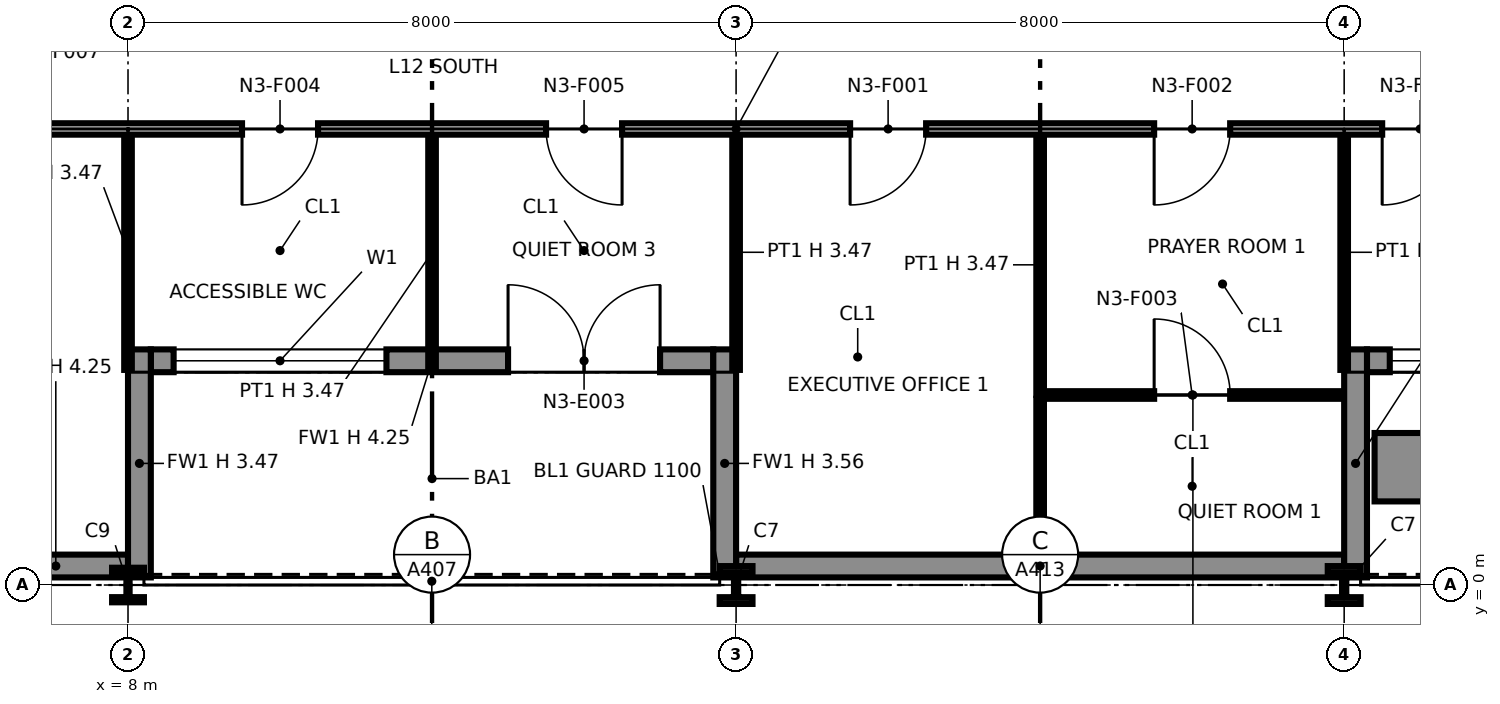
"""IFC4 building model, lengths in metres.
Left out: names, types, materials, properties, quantities, classifications, styles, units other than length and angle.
Written with IfcOpenShell. Run it as: python <this file> out.ifc"""

import sys

from ifc_helpers import new_model, si_unit, direction, frame, frame_2d, origin, origin_2d, place, context, subcontext, project, spatial, rectangle, i_section, extrude, element, fill, save


model = new_model("IFC4")
c1 = context("Model", 3, precision=1e-05, world=origin(), true_north=direction((0.0, 1.0)))
c2 = subcontext(c1, "Body", "Model", "MODEL_VIEW")
j1 = project(units=[si_unit("LENGTHUNIT", "METRE"), si_unit("PLANEANGLEUNIT", "RADIAN")], contexts=[c1])
p1 = place(None, origin())
s1 = spatial("IfcSite", under=j1, at=p1, CompositionType="ELEMENT")
p2 = place(p1, origin())
s2 = spatial("IfcBuilding", under=s1, at=p2, CompositionType="ELEMENT")
p3 = place(p2, frame((0.0, 0.0, 70.0)))
s3 = spatial("IfcBuildingStorey", under=s2, at=p3, CompositionType="ELEMENT", Elevation=70.0)
p4 = place(p3, frame((8.0, 0.0, 0.0), z_axis=(0.0, 0.0, 1.0), x_axis=(1.0, 0.0, 0.0)))
e1 = element("IfcColumn", 1, at=p4, inside=s3, PredefinedType="COLUMN", context=c2, shape_type="SweptSolid", body=[
    extrude(i_section(OverallWidth=0.419, OverallDepth=0.455, WebThickness=0.042, FlangeThickness=0.068, at=origin_2d()), origin(), (0.0, 0.0, 1.0), 4.25),
])
for number, where, z_axis, x_axis in (
    (2, (16.0, 0.0, 0.0), (0.0, 0.0, 1.0), (1.0, 0.0, 0.0)),
    (3, (24.0, 0.0, 0.0), (0.0, 0.0, 1.0), (1.0, 0.0, 0.0)),
):
    element("IfcColumn", number, at=place(p3, frame(where, z_axis=z_axis, x_axis=x_axis)), inside=s3, PredefinedType="COLUMN", context=c2, shape_type="SweptSolid", body=[
        extrude(i_section(OverallWidth=0.432, OverallDepth=0.498, WebThickness=0.056, FlangeThickness=0.089, at=origin_2d()), origin(), (0.0, 0.0, 1.0), 4.25),
    ])
p5 = place(p3, frame((6.1, 0.25, 0.0), z_axis=(0.0, 0.0, 1.0), x_axis=(1.0, 0.0, 0.0)))
e4 = element("IfcWall", 4, at=p5, inside=s3, PredefinedType="SOLIDWALL", context=c2, shape_type="SweptSolid", body=[
    extrude(rectangle(XDim=1.9, YDim=0.3, at=frame_2d((0.95, 0.0))), origin(), (0.0, 0.0, 1.0), 4.25),
])
p6 = place(p3, frame((8.3, 2.95, 0.0), z_axis=(0.0, 0.0, 1.0), x_axis=(1.0, 0.0, 0.0)))
e5 = element("IfcWall", 5, at=p6, inside=s3, PredefinedType="SOLIDWALL", context=c2, shape_type="SweptSolid", body=[
    extrude(rectangle(XDim=7.4, YDim=0.3, at=frame_2d((3.7, 0.0))), origin(), (0.0, 0.0, 1.0), 4.25),
])
p7 = place(p6, frame((0.3, 0.0, 0.9)))
e6 = element("IfcOpeningElement", 6, at=p7, cuts=e5, PredefinedType="OPENING", context=c2, shape_type="SweptSolid", body=[
    extrude(rectangle(XDim=2.8, YDim=2.2, at=frame_2d((1.4, 1.1))), frame((0.0, 0.16, 0.0), z_axis=(0.0, -1.0, 0.0), x_axis=(1.0, 0.0, 0.0)), (0.0, 0.0, 1.0), 0.32),
])
p8 = place(p6, frame((4.7, 0.0, 0.0)))
e7 = element("IfcOpeningElement", 7, at=p8, cuts=e5, PredefinedType="OPENING", context=c2, shape_type="SweptSolid", body=[
    extrude(rectangle(XDim=2.0, YDim=2.4, at=frame_2d((1.0, 1.2))), frame((0.0, 0.16, 0.0), z_axis=(0.0, -1.0, 0.0), x_axis=(1.0, 0.0, 0.0)), (0.0, 0.0, 1.0), 0.32),
])
p9 = place(p3, frame((8.15, 0.1, 0.0), z_axis=(0.0, 0.0, 1.0), x_axis=(0.0, 1.0, 0.0)))
e8 = element("IfcWall", 8, at=p9, inside=s3, PredefinedType="SOLIDWALL", context=c2, shape_type="SweptSolid", body=[
    extrude(rectangle(XDim=3.0, YDim=0.3, at=frame_2d((1.5, 0.0))), origin(), (0.0, 0.0, 1.0), 3.469),
])
p10 = place(p3, frame((15.85, 0.1, 0.0), z_axis=(0.0, 0.0, 1.0), x_axis=(0.0, 1.0, 0.0)))
e9 = element("IfcWall", 9, at=p10, inside=s3, PredefinedType="SOLIDWALL", context=c2, shape_type="SweptSolid", body=[
    extrude(rectangle(XDim=3.0, YDim=0.3, at=frame_2d((1.5, 0.0))), origin(), (0.0, 0.0, 1.0), 3.556),
])
p11 = place(p3, frame((16.0, 0.25, 0.0), z_axis=(0.0, 0.0, 1.0), x_axis=(1.0, 0.0, 0.0)))
e10 = element("IfcWall", 10, at=p11, inside=s3, PredefinedType="SOLIDWALL", context=c2, shape_type="SweptSolid", body=[
    extrude(rectangle(XDim=8.0, YDim=0.3, at=frame_2d((4.0, 0.0))), origin(), (0.0, 0.0, 1.0), 4.25),
])
p12 = place(p3, frame((24.3, 2.95, 0.0), z_axis=(0.0, 0.0, 1.0), x_axis=(1.0, 0.0, 0.0)))
e11 = element("IfcWall", 11, at=p12, inside=s3, PredefinedType="SOLIDWALL", context=c2, shape_type="SweptSolid", body=[
    extrude(rectangle(XDim=7.4, YDim=0.3, at=frame_2d((3.7, 0.0))), origin(), (0.0, 0.0, 1.0), 4.25),
])
p13 = place(p12, frame((0.3, 0.0, 0.9)))
e12 = element("IfcOpeningElement", 12, at=p13, cuts=e11, PredefinedType="OPENING", context=c2, shape_type="SweptSolid", body=[
    extrude(rectangle(XDim=2.8, YDim=2.2, at=frame_2d((1.4, 1.1))), frame((0.0, 0.16, 0.0), z_axis=(0.0, -1.0, 0.0), x_axis=(1.0, 0.0, 0.0)), (0.0, 0.0, 1.0), 0.32),
])
p14 = place(p12, frame((4.7, 0.0, 0.0)))
e13 = element("IfcOpeningElement", 13, at=p14, cuts=e11, PredefinedType="OPENING", context=c2, shape_type="SweptSolid", body=[
    extrude(rectangle(XDim=2.0, YDim=2.4, at=frame_2d((1.0, 1.2))), frame((0.0, 0.16, 0.0), z_axis=(0.0, -1.0, 0.0), x_axis=(1.0, 0.0, 0.0)), (0.0, 0.0, 1.0), 0.32),
])
p15 = place(p3, frame((24.15, 0.1, 0.0), z_axis=(0.0, 0.0, 1.0), x_axis=(0.0, 1.0, 0.0)))
e14 = element("IfcWall", 14, at=p15, inside=s3, PredefinedType="SOLIDWALL", context=c2, shape_type="SweptSolid", body=[
    extrude(rectangle(XDim=3.0, YDim=0.3, at=frame_2d((1.5, 0.0))), origin(), (0.0, 0.0, 1.0), 3.556),
])
p16 = place(p3, frame((24.4, 1.55, 0.0), z_axis=(0.0, 0.0, 1.0), x_axis=(1.0, 0.0, 0.0)))
e15 = element("IfcWall", 15, at=p16, inside=s3, PredefinedType="SOLIDWALL", context=c2, shape_type="SweptSolid", body=[
    extrude(rectangle(XDim=3.2, YDim=0.9, at=frame_2d((1.6, 0.0))), origin(), (0.0, 0.0, 1.0), 0.6),
])
p17 = place(p3, frame((20.0, 0.13, 0.0), z_axis=(0.0, 0.0, 1.0), x_axis=(0.0, 1.0, 0.0)))
e16 = element("IfcWall", 16, at=p17, inside=s3, PredefinedType="PARTITIONING", context=c2, shape_type="SweptSolid", body=[
    extrude(rectangle(XDim=2.32, YDim=0.1, at=frame_2d((1.16, 0.0))), origin(), (0.0, 0.0, 1.0), 4.25),
])
p18 = place(p3, frame((20.05, 2.5, 0.0), z_axis=(0.0, 0.0, 1.0), x_axis=(1.0, 0.0, 0.0)))
e17 = element("IfcWall", 17, at=p18, inside=s3, PredefinedType="PARTITIONING", context=c2, shape_type="SweptSolid", body=[
    extrude(rectangle(XDim=3.92, YDim=0.1, at=frame_2d((1.96, 0.0))), origin(), (0.0, 0.0, 1.0), 4.25),
])
p19 = place(p18, frame((1.45, 0.0, 0.0)))
e18 = element("IfcOpeningElement", 18, at=p19, cuts=e17, PredefinedType="OPENING", context=c2, shape_type="SweptSolid", body=[
    extrude(rectangle(XDim=1.0, YDim=2.1, at=frame_2d((0.5, 1.05))), frame((0.0, 0.06, 0.0), z_axis=(0.0, -1.0, 0.0), x_axis=(1.0, 0.0, 0.0)), (0.0, 0.0, 1.0), 0.12),
])
p20 = place(p3, frame((20.0, 2.5, 0.0), z_axis=(0.0, 0.0, 1.0), x_axis=(0.0, 1.0, 0.0)))
e19 = element("IfcWall", 19, at=p20, inside=s3, PredefinedType="PARTITIONING", context=c2, shape_type="SweptSolid", body=[
    extrude(rectangle(XDim=3.425, YDim=0.1, at=frame_2d((1.712, 0.0))), origin(), (0.0, 0.0, 1.0), 3.47),
])
for number, where, z_axis, x_axis in (
    (20, (8.0, 2.83, 0.0), (0.0, 0.0, 1.0), (0.0, 1.0, 0.0)),
    (21, (12.0, 2.83, 0.0), (0.0, 0.0, 1.0), (0.0, 1.0, 0.0)),
    (22, (16.0, 2.83, 0.0), (0.0, 0.0, 1.0), (0.0, 1.0, 0.0)),
    (23, (24.0, 2.83, 0.0), (0.0, 0.0, 1.0), (0.0, 1.0, 0.0)),
):
    element("IfcWall", number, at=place(p3, frame(where, z_axis=z_axis, x_axis=x_axis)), inside=s3, PredefinedType="PARTITIONING", context=c2, shape_type="SweptSolid", body=[
        extrude(rectangle(XDim=3.095, YDim=0.1, at=frame_2d((1.547, 0.0))), origin(), (0.0, 0.0, 1.0), 3.47),
    ])
p21 = place(p3, frame((6.075, 6.0, 0.0), z_axis=(0.0, 0.0, 1.0), x_axis=(1.0, 0.0, 0.0)))
e24 = element("IfcWall", 24, at=p21, inside=s3, PredefinedType="PARTITIONING", context=c2, shape_type="SweptSolid", body=[
    extrude(rectangle(XDim=19.85, YDim=0.15, at=frame_2d((9.925, 0.0))), origin(), (0.0, 0.0, 1.0), 4.25),
])
p22 = place(p21, frame((12.425, 0.0, 0.0), z_axis=(0.0, 0.0, 1.0), x_axis=(-1.0, 0.0, 0.0)))
e25 = element("IfcOpeningElement", 25, at=p22, cuts=e24, PredefinedType="OPENING", context=c2, shape_type="SweptSolid", body=[
    extrude(rectangle(XDim=1.0, YDim=2.1, at=frame_2d((0.5, 1.05))), frame((0.0, 0.085, 0.0), z_axis=(0.0, -1.0, 0.0), x_axis=(1.0, 0.0, 0.0)), (0.0, 0.0, 1.0), 0.17),
])
p23 = place(p21, frame((16.425, 0.0, 0.0), z_axis=(0.0, 0.0, 1.0), x_axis=(-1.0, 0.0, 0.0)))
e26 = element("IfcOpeningElement", 26, at=p23, cuts=e24, PredefinedType="OPENING", context=c2, shape_type="SweptSolid", body=[
    extrude(rectangle(XDim=1.0, YDim=2.1, at=frame_2d((0.5, 1.05))), frame((0.0, 0.085, 0.0), z_axis=(0.0, -1.0, 0.0), x_axis=(1.0, 0.0, 0.0)), (0.0, 0.0, 1.0), 0.17),
])
p24 = place(p21, frame((4.425, 0.0, 0.0), z_axis=(0.0, 0.0, 1.0), x_axis=(-1.0, 0.0, 0.0)))
e27 = element("IfcOpeningElement", 27, at=p24, cuts=e24, PredefinedType="OPENING", context=c2, shape_type="SweptSolid", body=[
    extrude(rectangle(XDim=1.0, YDim=2.1, at=frame_2d((0.5, 1.05))), frame((0.0, 0.085, 0.0), z_axis=(0.0, -1.0, 0.0), x_axis=(1.0, 0.0, 0.0)), (0.0, 0.0, 1.0), 0.17),
])
p25 = place(p21, frame((8.425, 0.0, 0.0), z_axis=(0.0, 0.0, 1.0), x_axis=(-1.0, 0.0, 0.0)))
e28 = element("IfcOpeningElement", 28, at=p25, cuts=e24, PredefinedType="OPENING", context=c2, shape_type="SweptSolid", body=[
    extrude(rectangle(XDim=1.0, YDim=2.1, at=frame_2d((0.5, 1.05))), frame((0.0, 0.085, 0.0), z_axis=(0.0, -1.0, 0.0), x_axis=(1.0, 0.0, 0.0)), (0.0, 0.0, 1.0), 0.17),
])
p26 = place(p21, frame((19.425, 0.0, 0.0), z_axis=(0.0, 0.0, 1.0), x_axis=(-1.0, 0.0, 0.0)))
e29 = element("IfcOpeningElement", 29, at=p26, cuts=e24, PredefinedType="OPENING", context=c2, shape_type="SweptSolid", body=[
    extrude(rectangle(XDim=1.0, YDim=2.1, at=frame_2d((0.5, 1.05))), frame((0.0, 0.085, 0.0), z_axis=(0.0, -1.0, 0.0), x_axis=(1.0, 0.0, 0.0)), (0.0, 0.0, 1.0), 0.17),
])
p27 = place(p7, origin())
e30 = element("IfcWindow", 30, at=p27, inside=s3, PartitioningType="SINGLE_PANEL", PredefinedType="WINDOW", context=c2, shape_type="SweptSolid", body=[
    extrude(rectangle(XDim=2.8, YDim=2.2, at=frame_2d((1.4, 1.1))), frame((0.0, 0.03, 0.0), z_axis=(0.0, -1.0, 0.0), x_axis=(1.0, 0.0, 0.0)), (0.0, 0.0, 1.0), 0.06),
])
fill(e6, e30)
p28 = place(p8, origin())
e31 = element("IfcDoor", 31, at=p28, inside=s3, OperationType="DOUBLE_DOOR_SINGLE_SWING", PredefinedType="DOOR", context=c2, shape_type="SweptSolid", body=[
    extrude(rectangle(XDim=2.0, YDim=2.4, at=frame_2d((1.0, 1.2))), frame((0.0, 0.025, 0.0), z_axis=(0.0, -1.0, 0.0), x_axis=(1.0, 0.0, 0.0)), (0.0, 0.0, 1.0), 0.05),
])
fill(e7, e31)
p29 = place(p13, origin())
e32 = element("IfcWindow", 32, at=p29, inside=s3, PartitioningType="SINGLE_PANEL", PredefinedType="WINDOW", context=c2, shape_type="SweptSolid", body=[
    extrude(rectangle(XDim=2.8, YDim=2.2, at=frame_2d((1.4, 1.1))), frame((0.0, 0.03, 0.0), z_axis=(0.0, -1.0, 0.0), x_axis=(1.0, 0.0, 0.0)), (0.0, 0.0, 1.0), 0.06),
])
fill(e12, e32)
p30 = place(p22, origin())
e33 = element("IfcDoor", 33, at=p30, inside=s3, OperationType="SINGLE_SWING_RIGHT", PredefinedType="DOOR", context=c2, shape_type="SweptSolid", body=[
    extrude(rectangle(XDim=1.0, YDim=2.1, at=frame_2d((0.5, 1.05))), frame((0.0, 0.025, 0.0), z_axis=(0.0, -1.0, 0.0), x_axis=(1.0, 0.0, 0.0)), (0.0, 0.0, 1.0), 0.05),
])
fill(e25, e33)
p31 = place(p23, origin())
e34 = element("IfcDoor", 34, at=p31, inside=s3, OperationType="SINGLE_SWING_RIGHT", PredefinedType="DOOR", context=c2, shape_type="SweptSolid", body=[
    extrude(rectangle(XDim=1.0, YDim=2.1, at=frame_2d((0.5, 1.05))), frame((0.0, 0.025, 0.0), z_axis=(0.0, -1.0, 0.0), x_axis=(1.0, 0.0, 0.0)), (0.0, 0.0, 1.0), 0.05),
])
fill(e26, e34)
p32 = place(p19, origin())
e35 = element("IfcDoor", 35, at=p32, inside=s3, OperationType="SINGLE_SWING_LEFT", PredefinedType="DOOR", context=c2, shape_type="SweptSolid", body=[
    extrude(rectangle(XDim=1.0, YDim=2.1, at=frame_2d((0.5, 1.05))), frame((0.0, 0.025, 0.0), z_axis=(0.0, -1.0, 0.0), x_axis=(1.0, 0.0, 0.0)), (0.0, 0.0, 1.0), 0.05),
])
fill(e18, e35)
p33 = place(p24, origin())
e36 = element("IfcDoor", 36, at=p33, inside=s3, OperationType="SINGLE_SWING_RIGHT", PredefinedType="DOOR", context=c2, shape_type="SweptSolid", body=[
    extrude(rectangle(XDim=1.0, YDim=2.1, at=frame_2d((0.5, 1.05))), frame((0.0, 0.025, 0.0), z_axis=(0.0, -1.0, 0.0), x_axis=(1.0, 0.0, 0.0)), (0.0, 0.0, 1.0), 0.05),
])
fill(e27, e36)
p34 = place(p25, origin())
e37 = element("IfcDoor", 37, at=p34, inside=s3, OperationType="SINGLE_SWING_LEFT", PredefinedType="DOOR", context=c2, shape_type="SweptSolid", body=[
    extrude(rectangle(XDim=1.0, YDim=2.1, at=frame_2d((0.5, 1.05))), frame((0.0, 0.025, 0.0), z_axis=(0.0, -1.0, 0.0), x_axis=(1.0, 0.0, 0.0)), (0.0, 0.0, 1.0), 0.05),
])
fill(e28, e37)
p35 = place(p26, origin())
e38 = element("IfcDoor", 38, at=p35, inside=s3, OperationType="SINGLE_SWING_RIGHT", PredefinedType="DOOR", context=c2, shape_type="SweptSolid", body=[
    extrude(rectangle(XDim=1.0, YDim=2.1, at=frame_2d((0.5, 1.05))), frame((0.0, 0.025, 0.0), z_axis=(0.0, -1.0, 0.0), x_axis=(1.0, 0.0, 0.0)), (0.0, 0.0, 1.0), 0.05),
])
fill(e29, e38)
save(model, sys.argv[1])
